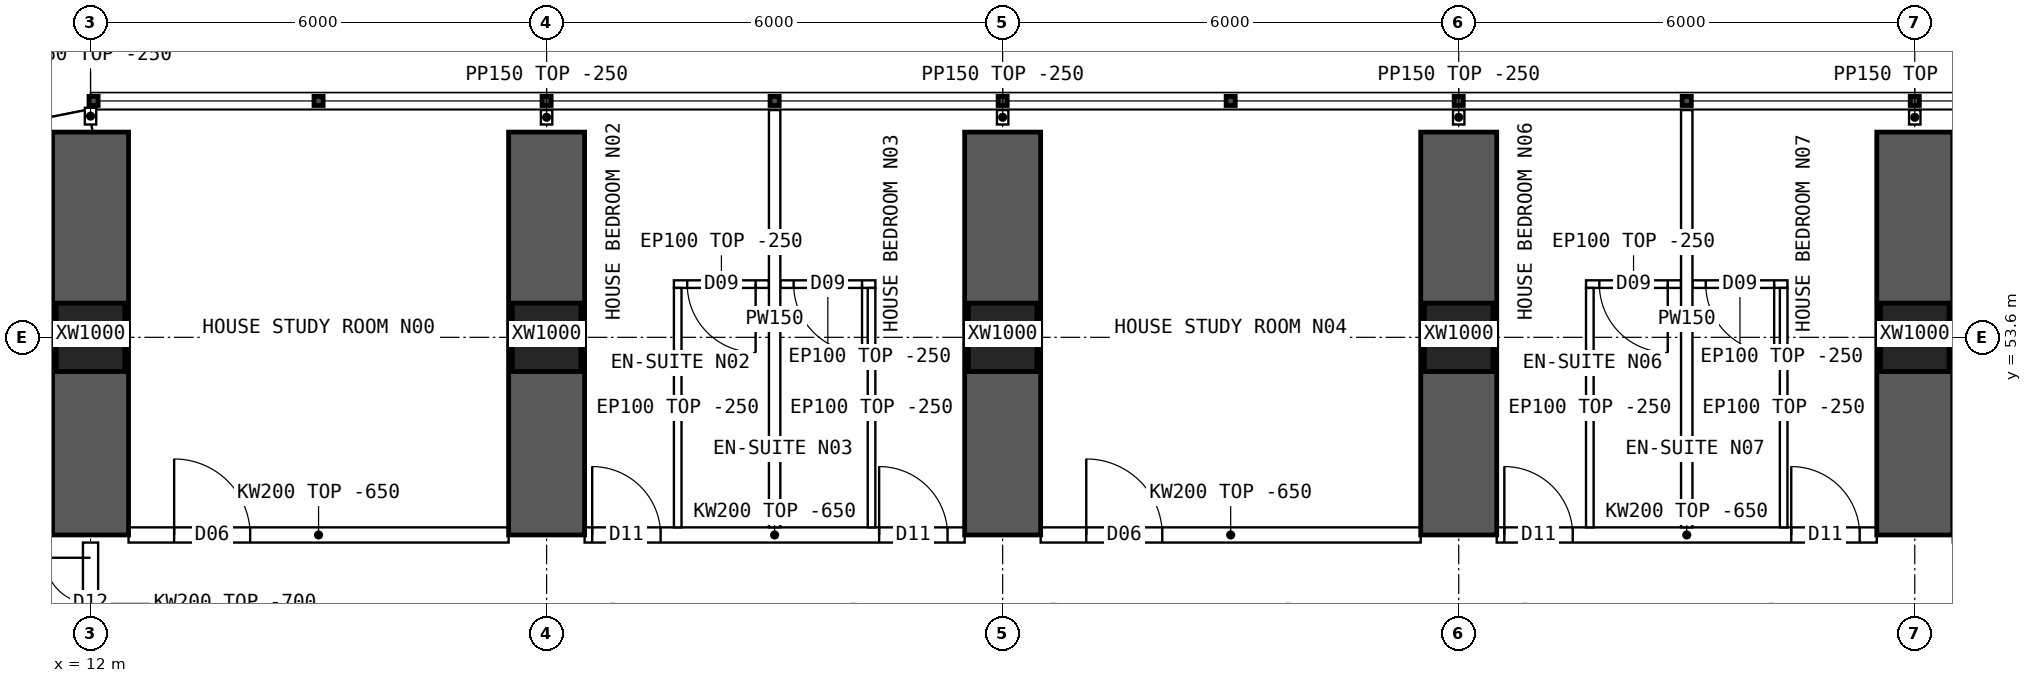
"""IFC4 building model, lengths in metres.
Left out: names, types, materials, properties, quantities, classifications, styles, units other than length and angle.
Written with IfcOpenShell. Run it as: python <this file> out.ifc"""

import sys

from ifc_helpers import new_model, si_unit, direction, frame, frame_2d, origin, origin_2d, place, context, subcontext, project, spatial, polyline, rectangle, hollow_rectangle, outline, extrude, element, fill, save


model = new_model("IFC4")
c1 = context("Model", 3, precision=1e-05, world=origin(), true_north=direction((0.0, 1.0)))
c2 = subcontext(c1, "Body", "Model", "MODEL_VIEW")
j1 = project(units=[si_unit("LENGTHUNIT", "METRE"), si_unit("PLANEANGLEUNIT", "RADIAN")], contexts=[c1])
p1 = place(None, origin())
s1 = spatial("IfcSite", under=j1, at=p1, CompositionType="ELEMENT")
p2 = place(p1, origin())
s2 = spatial("IfcBuilding", under=s1, at=p2, CompositionType="ELEMENT")
p3 = place(p2, frame((0.0, 0.0, 57.7)))
s3 = spatial("IfcBuildingStorey", under=s2, at=p3, CompositionType="ELEMENT", Elevation=57.7)
for number, where, z_axis, x_axis in (
    (1, (12.0, 53.6, 0.0), (0.0, 0.0, 1.0), (1.0, 0.0, 0.0)),
    (2, (18.0, 53.6, 0.0), (0.0, 0.0, 1.0), (1.0, 0.0, 0.0)),
    (3, (24.0, 53.6, 0.0), (0.0, 0.0, 1.0), (1.0, 0.0, 0.0)),
    (4, (30.0, 53.6, 0.0), (0.0, 0.0, 1.0), (1.0, 0.0, 0.0)),
    (5, (36.0, 53.6, 0.0), (0.0, 0.0, 1.0), (1.0, 0.0, 0.0)),
):
    element("IfcColumn", number, at=place(p3, frame(where, z_axis=z_axis, x_axis=x_axis)), inside=s3, PredefinedType="COLUMN", context=c2, shape_type="SweptSolid", body=[
        extrude(hollow_rectangle(XDim=0.9, YDim=0.9, WallThickness=0.09, at=origin_2d()), origin(), (0.0, 0.0, 1.0), 3.75),
    ])
for number, where, z_axis, x_axis in (
    (6, (12.0, 51.0, 0.0), (0.0, 0.0, 1.0), (0.0, 1.0, 0.0)),
    (7, (18.0, 51.0, 0.0), (0.0, 0.0, 1.0), (0.0, 1.0, 0.0)),
    (8, (24.0, 51.0, 0.0), (0.0, 0.0, 1.0), (0.0, 1.0, 0.0)),
    (9, (30.0, 51.0, 0.0), (0.0, 0.0, 1.0), (0.0, 1.0, 0.0)),
    (10, (36.0, 51.0, 0.0), (0.0, 0.0, 1.0), (0.0, 1.0, 0.0)),
):
    element("IfcWall", number, at=place(p3, frame(where, z_axis=z_axis, x_axis=x_axis)), inside=s3, PredefinedType="SHEAR", context=c2, shape_type="SweptSolid", body=[
        extrude(rectangle(XDim=5.3, YDim=1.0, at=frame_2d((2.65, 0.0))), origin(), (0.0, 0.0, 1.0), 3.75),
    ])
p4 = place(p3, frame((12.0, 56.45, 0.0), z_axis=(0.0, 0.0, 1.0), x_axis=(-0.980787251524, -0.195080412259, 0.0)))
e11 = element("IfcWall", 11, at=p4, inside=s3, PredefinedType="SOLIDWALL", context=c2, shape_type="SweptSolid", body=[
    extrude(outline(polyline([(-0.03, -0.15), (3.249, -0.15), (3.189, 0.15), (0.03, 0.15), (-0.03, -0.15)])), origin(), (0.0, 0.0, 1.0), 3.5),
])
p5 = place(p4, frame((0.909, 0.0, 0.9)))
e12 = element("IfcOpeningElement", 12, at=p5, cuts=e11, PredefinedType="OPENING", context=c2, shape_type="SweptSolid", body=[
    extrude(rectangle(XDim=1.4, YDim=1.8, at=frame_2d((0.7, 0.9))), frame((0.0, 0.16, 0.0), z_axis=(0.0, -1.0, 0.0), x_axis=(1.0, 0.0, 0.0)), (0.0, 0.0, 1.0), 0.32),
])
p6 = place(p3, frame((12.5, 51.0, 0.0), z_axis=(0.0, 0.0, 1.0), x_axis=(1.0, 0.0, 0.0)))
e13 = element("IfcWall", 13, at=p6, inside=s3, PredefinedType="SOLIDWALL", context=c2, shape_type="SweptSolid", body=[
    extrude(outline(polyline([(0.0, 0.0), (5.0, 0.0), (5.0, 3.1), (0.0, 3.1), (0.0, 0.0)])), frame((0.0, 0.1, 0.0), z_axis=(0.0, -1.0, 0.0), x_axis=(1.0, 0.0, 0.0)), (0.0, 0.0, 1.0), 0.2),
])
p7 = place(p6, frame((0.6, 0.0, 0.0)))
e14 = element("IfcOpeningElement", 14, at=p7, cuts=e13, PredefinedType="OPENING", context=c2, shape_type="SweptSolid", body=[
    extrude(rectangle(XDim=1.0, YDim=2.1, at=frame_2d((0.5, 1.05))), frame((0.0, 0.11, 0.0), z_axis=(0.0, -1.0, 0.0), x_axis=(1.0, 0.0, 0.0)), (0.0, 0.0, 1.0), 0.22),
])
p8 = place(p3, frame((18.5, 51.0, 0.0), z_axis=(0.0, 0.0, 1.0), x_axis=(1.0, 0.0, 0.0)))
e15 = element("IfcWall", 15, at=p8, inside=s3, PredefinedType="SOLIDWALL", context=c2, shape_type="SweptSolid", body=[
    extrude(outline(polyline([(0.0, 0.0), (5.0, 0.0), (5.0, 3.1), (0.0, 3.1), (0.0, 0.0)])), frame((0.0, 0.1, 0.0), z_axis=(0.0, -1.0, 0.0), x_axis=(1.0, 0.0, 0.0)), (0.0, 0.0, 1.0), 0.2),
])
p9 = place(p8, frame((0.1, 0.0, 0.0)))
e16 = element("IfcOpeningElement", 16, at=p9, cuts=e15, PredefinedType="OPENING", context=c2, shape_type="SweptSolid", body=[
    extrude(rectangle(XDim=0.9, YDim=2.1, at=frame_2d((0.45, 1.05))), frame((0.0, 0.11, 0.0), z_axis=(0.0, -1.0, 0.0), x_axis=(1.0, 0.0, 0.0)), (0.0, 0.0, 1.0), 0.22),
])
p10 = place(p8, frame((3.875, 0.0, 0.0)))
e17 = element("IfcOpeningElement", 17, at=p10, cuts=e15, PredefinedType="OPENING", context=c2, shape_type="SweptSolid", body=[
    extrude(rectangle(XDim=0.9, YDim=2.1, at=frame_2d((0.45, 1.05))), frame((0.0, 0.11, 0.0), z_axis=(0.0, -1.0, 0.0), x_axis=(1.0, 0.0, 0.0)), (0.0, 0.0, 1.0), 0.22),
])
p11 = place(p3, frame((24.5, 51.0, 0.0), z_axis=(0.0, 0.0, 1.0), x_axis=(1.0, 0.0, 0.0)))
e18 = element("IfcWall", 18, at=p11, inside=s3, PredefinedType="SOLIDWALL", context=c2, shape_type="SweptSolid", body=[
    extrude(outline(polyline([(0.0, 0.0), (5.0, 0.0), (5.0, 3.1), (0.0, 3.1), (0.0, 0.0)])), frame((0.0, 0.1, 0.0), z_axis=(0.0, -1.0, 0.0), x_axis=(1.0, 0.0, 0.0)), (0.0, 0.0, 1.0), 0.2),
])
p12 = place(p11, frame((0.6, 0.0, 0.0)))
e19 = element("IfcOpeningElement", 19, at=p12, cuts=e18, PredefinedType="OPENING", context=c2, shape_type="SweptSolid", body=[
    extrude(rectangle(XDim=1.0, YDim=2.1, at=frame_2d((0.5, 1.05))), frame((0.0, 0.11, 0.0), z_axis=(0.0, -1.0, 0.0), x_axis=(1.0, 0.0, 0.0)), (0.0, 0.0, 1.0), 0.22),
])
p13 = place(p3, frame((30.5, 51.0, 0.0), z_axis=(0.0, 0.0, 1.0), x_axis=(1.0, 0.0, 0.0)))
e20 = element("IfcWall", 20, at=p13, inside=s3, PredefinedType="SOLIDWALL", context=c2, shape_type="SweptSolid", body=[
    extrude(outline(polyline([(0.0, 0.0), (5.0, 0.0), (5.0, 3.1), (0.0, 3.1), (0.0, 0.0)])), frame((0.0, 0.1, 0.0), z_axis=(0.0, -1.0, 0.0), x_axis=(1.0, 0.0, 0.0)), (0.0, 0.0, 1.0), 0.2),
])
p14 = place(p13, frame((0.1, 0.0, 0.0)))
e21 = element("IfcOpeningElement", 21, at=p14, cuts=e20, PredefinedType="OPENING", context=c2, shape_type="SweptSolid", body=[
    extrude(rectangle(XDim=0.9, YDim=2.1, at=frame_2d((0.45, 1.05))), frame((0.0, 0.11, 0.0), z_axis=(0.0, -1.0, 0.0), x_axis=(1.0, 0.0, 0.0)), (0.0, 0.0, 1.0), 0.22),
])
p15 = place(p13, frame((3.875, 0.0, 0.0)))
e22 = element("IfcOpeningElement", 22, at=p15, cuts=e20, PredefinedType="OPENING", context=c2, shape_type="SweptSolid", body=[
    extrude(rectangle(XDim=0.9, YDim=2.1, at=frame_2d((0.45, 1.05))), frame((0.0, 0.11, 0.0), z_axis=(0.0, -1.0, 0.0), x_axis=(1.0, 0.0, 0.0)), (0.0, 0.0, 1.0), 0.22),
])
p16 = place(p3, frame((21.0, 56.59, 0.0), z_axis=(0.0, 0.0, 1.0), x_axis=(0.0, -1.0, 0.0)))
e23 = element("IfcWall", 23, at=p16, inside=s3, PredefinedType="PARTITIONING", context=c2, shape_type="SweptSolid", body=[
    extrude(outline(polyline([(0.0, 0.0), (5.49, 0.0), (5.49, 3.1), (5.442, 3.1), (5.44, 3.5), (3.192, 3.5), (3.19, 3.1), (2.792, 3.1), (2.79, 3.5), (0.0, 3.5), (0.0, 0.0)])), frame((0.0, 0.075, 0.0), z_axis=(0.0, -1.0, 0.0), x_axis=(1.0, 0.0, 0.0)), (0.0, 0.0, 1.0), 0.15),
])
p17 = place(p3, frame((19.675, 54.3, 0.0), z_axis=(0.0, 0.0, 1.0), x_axis=(1.0, 0.0, 0.0)))
e24 = element("IfcWall", 24, at=p17, inside=s3, PredefinedType="PARTITIONING", context=c2, shape_type="SweptSolid", body=[
    extrude(rectangle(XDim=1.25, YDim=0.1, at=frame_2d((0.625, 0.0))), origin(), (0.0, 0.0, 1.0), 3.5),
])
p18 = place(p17, frame((0.175, 0.0, 0.0)))
e25 = element("IfcOpeningElement", 25, at=p18, cuts=e24, PredefinedType="OPENING", context=c2, shape_type="SweptSolid", body=[
    extrude(rectangle(XDim=0.9, YDim=2.1, at=frame_2d((0.45, 1.05))), frame((0.0, 0.06, 0.0), z_axis=(0.0, -1.0, 0.0), x_axis=(1.0, 0.0, 0.0)), (0.0, 0.0, 1.0), 0.12),
])
p19 = place(p3, frame((19.725, 54.25, 0.0), z_axis=(0.0, 0.0, 1.0), x_axis=(0.0, -1.0, 0.0)))
e26 = element("IfcWall", 26, at=p19, inside=s3, PredefinedType="PARTITIONING", context=c2, shape_type="SweptSolid", body=[
    extrude(outline(polyline([(0.0, 0.0), (3.15, 0.0), (3.15, 3.1), (3.102, 3.1), (3.1, 3.5), (0.852, 3.5), (0.85, 3.1), (0.452, 3.1), (0.45, 3.5), (0.0, 3.5), (0.0, 0.0)])), frame((0.0, 0.05, 0.0), z_axis=(0.0, -1.0, 0.0), x_axis=(1.0, 0.0, 0.0)), (0.0, 0.0, 1.0), 0.1),
])
p20 = place(p3, frame((21.075, 54.3, 0.0), z_axis=(0.0, 0.0, 1.0), x_axis=(1.0, 0.0, 0.0)))
e27 = element("IfcWall", 27, at=p20, inside=s3, PredefinedType="PARTITIONING", context=c2, shape_type="SweptSolid", body=[
    extrude(rectangle(XDim=1.25, YDim=0.1, at=frame_2d((0.625, 0.0))), origin(), (0.0, 0.0, 1.0), 3.5),
])
p21 = place(p20, frame((0.175, 0.0, 0.0)))
e28 = element("IfcOpeningElement", 28, at=p21, cuts=e27, PredefinedType="OPENING", context=c2, shape_type="SweptSolid", body=[
    extrude(rectangle(XDim=0.9, YDim=2.1, at=frame_2d((0.45, 1.05))), frame((0.0, 0.06, 0.0), z_axis=(0.0, -1.0, 0.0), x_axis=(1.0, 0.0, 0.0)), (0.0, 0.0, 1.0), 0.12),
])
p22 = place(p3, frame((22.275, 54.25, 0.0), z_axis=(0.0, 0.0, 1.0), x_axis=(0.0, -1.0, 0.0)))
e29 = element("IfcWall", 29, at=p22, inside=s3, PredefinedType="PARTITIONING", context=c2, shape_type="SweptSolid", body=[
    extrude(outline(polyline([(0.0, 0.0), (3.15, 0.0), (3.15, 3.1), (3.102, 3.1), (3.1, 3.5), (0.852, 3.5), (0.85, 3.1), (0.452, 3.1), (0.45, 3.5), (0.0, 3.5), (0.0, 0.0)])), frame((0.0, 0.05, 0.0), z_axis=(0.0, -1.0, 0.0), x_axis=(1.0, 0.0, 0.0)), (0.0, 0.0, 1.0), 0.1),
])
p23 = place(p3, frame((33.0, 56.59, 0.0), z_axis=(0.0, 0.0, 1.0), x_axis=(0.0, -1.0, 0.0)))
e30 = element("IfcWall", 30, at=p23, inside=s3, PredefinedType="PARTITIONING", context=c2, shape_type="SweptSolid", body=[
    extrude(outline(polyline([(0.0, 0.0), (5.49, 0.0), (5.49, 3.1), (5.442, 3.1), (5.44, 3.5), (3.192, 3.5), (3.19, 3.1), (2.792, 3.1), (2.79, 3.5), (0.0, 3.5), (0.0, 0.0)])), frame((0.0, 0.075, 0.0), z_axis=(0.0, -1.0, 0.0), x_axis=(1.0, 0.0, 0.0)), (0.0, 0.0, 1.0), 0.15),
])
p24 = place(p3, frame((31.675, 54.3, 0.0), z_axis=(0.0, 0.0, 1.0), x_axis=(1.0, 0.0, 0.0)))
e31 = element("IfcWall", 31, at=p24, inside=s3, PredefinedType="PARTITIONING", context=c2, shape_type="SweptSolid", body=[
    extrude(rectangle(XDim=1.25, YDim=0.1, at=frame_2d((0.625, 0.0))), origin(), (0.0, 0.0, 1.0), 3.5),
])
p25 = place(p24, frame((0.175, 0.0, 0.0)))
e32 = element("IfcOpeningElement", 32, at=p25, cuts=e31, PredefinedType="OPENING", context=c2, shape_type="SweptSolid", body=[
    extrude(rectangle(XDim=0.9, YDim=2.1, at=frame_2d((0.45, 1.05))), frame((0.0, 0.06, 0.0), z_axis=(0.0, -1.0, 0.0), x_axis=(1.0, 0.0, 0.0)), (0.0, 0.0, 1.0), 0.12),
])
p26 = place(p3, frame((31.725, 54.25, 0.0), z_axis=(0.0, 0.0, 1.0), x_axis=(0.0, -1.0, 0.0)))
e33 = element("IfcWall", 33, at=p26, inside=s3, PredefinedType="PARTITIONING", context=c2, shape_type="SweptSolid", body=[
    extrude(outline(polyline([(0.0, 0.0), (3.15, 0.0), (3.15, 3.1), (3.102, 3.1), (3.1, 3.5), (0.852, 3.5), (0.85, 3.1), (0.452, 3.1), (0.45, 3.5), (0.0, 3.5), (0.0, 0.0)])), frame((0.0, 0.05, 0.0), z_axis=(0.0, -1.0, 0.0), x_axis=(1.0, 0.0, 0.0)), (0.0, 0.0, 1.0), 0.1),
])
p27 = place(p3, frame((33.075, 54.3, 0.0), z_axis=(0.0, 0.0, 1.0), x_axis=(1.0, 0.0, 0.0)))
e34 = element("IfcWall", 34, at=p27, inside=s3, PredefinedType="PARTITIONING", context=c2, shape_type="SweptSolid", body=[
    extrude(rectangle(XDim=1.25, YDim=0.1, at=frame_2d((0.625, 0.0))), origin(), (0.0, 0.0, 1.0), 3.5),
])
p28 = place(p27, frame((0.175, 0.0, 0.0)))
e35 = element("IfcOpeningElement", 35, at=p28, cuts=e34, PredefinedType="OPENING", context=c2, shape_type="SweptSolid", body=[
    extrude(rectangle(XDim=0.9, YDim=2.1, at=frame_2d((0.45, 1.05))), frame((0.0, 0.06, 0.0), z_axis=(0.0, -1.0, 0.0), x_axis=(1.0, 0.0, 0.0)), (0.0, 0.0, 1.0), 0.12),
])
p29 = place(p3, frame((34.275, 54.25, 0.0), z_axis=(0.0, 0.0, 1.0), x_axis=(0.0, -1.0, 0.0)))
e36 = element("IfcWall", 36, at=p29, inside=s3, PredefinedType="PARTITIONING", context=c2, shape_type="SweptSolid", body=[
    extrude(outline(polyline([(0.0, 0.0), (3.15, 0.0), (3.15, 3.1), (3.102, 3.1), (3.1, 3.5), (0.852, 3.5), (0.85, 3.1), (0.452, 3.1), (0.45, 3.5), (0.0, 3.5), (0.0, 0.0)])), frame((0.0, 0.05, 0.0), z_axis=(0.0, -1.0, 0.0), x_axis=(1.0, 0.0, 0.0)), (0.0, 0.0, 1.0), 0.1),
])
p30 = place(p3, frame((12.0, 49.3, 0.0), z_axis=(0.0, 0.0, 1.0), x_axis=(0.0, 1.0, 0.0)))
e37 = element("IfcWall", 37, at=p30, inside=s3, PredefinedType="SOLIDWALL", context=c2, shape_type="SweptSolid", body=[
    extrude(outline(polyline([(0.0, 0.0), (1.6, 0.0), (1.6, 3.05), (0.0, 3.05), (0.0, 0.0)])), frame((0.0, 0.1, 0.0), z_axis=(0.0, -1.0, 0.0), x_axis=(1.0, 0.0, 0.0)), (0.0, 0.0, 1.0), 0.2),
])
p31 = place(p30, frame((0.2, 0.0, 0.0)))
e38 = element("IfcOpeningElement", 38, at=p31, cuts=e37, PredefinedType="OPENING", context=c2, shape_type="SweptSolid", body=[
    extrude(rectangle(XDim=1.2, YDim=2.1, at=frame_2d((0.6, 1.05))), frame((0.0, 0.11, 0.0), z_axis=(0.0, -1.0, 0.0), x_axis=(1.0, 0.0, 0.0)), (0.0, 0.0, 1.0), 0.22),
])
p32 = place(p3, frame((12.0, 56.4, 0.0), z_axis=(0.0, 0.0, 1.0), x_axis=(0.0, 1.0, 0.0)))
e39 = element("IfcWall", 39, at=p32, inside=s3, PredefinedType="PARTITIONING", context=c2, shape_type="SweptSolid", body=[
    extrude(rectangle(XDim=0.22, YDim=0.15, at=frame_2d((0.11, 0.0))), origin(), (0.0, 0.0, 1.0), 3.5),
])
for number, where, z_axis, x_axis in (
    (40, (18.0, 56.4, 0.0), (0.0, 0.0, 1.0), (0.0, 1.0, 0.0)),
    (41, (24.0, 56.4, 0.0), (0.0, 0.0, 1.0), (0.0, 1.0, 0.0)),
    (42, (30.0, 56.4, 0.0), (0.0, 0.0, 1.0), (0.0, 1.0, 0.0)),
    (43, (36.0, 56.4, 0.0), (0.0, 0.0, 1.0), (0.0, 1.0, 0.0)),
):
    element("IfcWall", number, at=place(p3, frame(where, z_axis=z_axis, x_axis=x_axis)), inside=s3, PredefinedType="PARTITIONING", context=c2, shape_type="SweptSolid", body=[
        extrude(rectangle(XDim=0.19, YDim=0.15, at=frame_2d((0.095, 0.0))), origin(), (0.0, 0.0, 1.0), 3.5),
    ])
p33 = place(p7, origin())
e44 = element("IfcDoor", 44, at=p33, inside=s3, OperationType="SINGLE_SWING_LEFT", PredefinedType="DOOR", context=c2, shape_type="SweptSolid", body=[
    extrude(rectangle(XDim=1.0, YDim=2.1, at=frame_2d((0.5, 1.05))), frame((0.0, 0.025, 0.0), z_axis=(0.0, -1.0, 0.0), x_axis=(1.0, 0.0, 0.0)), (0.0, 0.0, 1.0), 0.05),
])
fill(e14, e44)
p34 = place(p18, origin())
e45 = element("IfcDoor", 45, at=p34, inside=s3, OperationType="SINGLE_SWING_RIGHT", PredefinedType="DOOR", context=c2, shape_type="SweptSolid", body=[
    extrude(rectangle(XDim=0.9, YDim=2.1, at=frame_2d((0.45, 1.05))), frame((0.0, 0.025, 0.0), z_axis=(0.0, -1.0, 0.0), x_axis=(1.0, 0.0, 0.0)), (0.0, 0.0, 1.0), 0.05),
])
fill(e25, e45)
p35 = place(p9, origin())
e46 = element("IfcDoor", 46, at=p35, inside=s3, OperationType="SINGLE_SWING_LEFT", PredefinedType="DOOR", context=c2, shape_type="SweptSolid", body=[
    extrude(rectangle(XDim=0.9, YDim=2.1, at=frame_2d((0.45, 1.05))), frame((0.0, 0.025, 0.0), z_axis=(0.0, -1.0, 0.0), x_axis=(1.0, 0.0, 0.0)), (0.0, 0.0, 1.0), 0.05),
])
fill(e16, e46)
p36 = place(p21, origin())
e47 = element("IfcDoor", 47, at=p36, inside=s3, OperationType="SINGLE_SWING_RIGHT", PredefinedType="DOOR", context=c2, shape_type="SweptSolid", body=[
    extrude(rectangle(XDim=0.9, YDim=2.1, at=frame_2d((0.45, 1.05))), frame((0.0, 0.025, 0.0), z_axis=(0.0, -1.0, 0.0), x_axis=(1.0, 0.0, 0.0)), (0.0, 0.0, 1.0), 0.05),
])
fill(e28, e47)
p37 = place(p10, origin())
e48 = element("IfcDoor", 48, at=p37, inside=s3, OperationType="SINGLE_SWING_LEFT", PredefinedType="DOOR", context=c2, shape_type="SweptSolid", body=[
    extrude(rectangle(XDim=0.9, YDim=2.1, at=frame_2d((0.45, 1.05))), frame((0.0, 0.025, 0.0), z_axis=(0.0, -1.0, 0.0), x_axis=(1.0, 0.0, 0.0)), (0.0, 0.0, 1.0), 0.05),
])
fill(e17, e48)
p38 = place(p12, origin())
e49 = element("IfcDoor", 49, at=p38, inside=s3, OperationType="SINGLE_SWING_LEFT", PredefinedType="DOOR", context=c2, shape_type="SweptSolid", body=[
    extrude(rectangle(XDim=1.0, YDim=2.1, at=frame_2d((0.5, 1.05))), frame((0.0, 0.025, 0.0), z_axis=(0.0, -1.0, 0.0), x_axis=(1.0, 0.0, 0.0)), (0.0, 0.0, 1.0), 0.05),
])
fill(e19, e49)
p39 = place(p25, origin())
e50 = element("IfcDoor", 50, at=p39, inside=s3, OperationType="SINGLE_SWING_RIGHT", PredefinedType="DOOR", context=c2, shape_type="SweptSolid", body=[
    extrude(rectangle(XDim=0.9, YDim=2.1, at=frame_2d((0.45, 1.05))), frame((0.0, 0.025, 0.0), z_axis=(0.0, -1.0, 0.0), x_axis=(1.0, 0.0, 0.0)), (0.0, 0.0, 1.0), 0.05),
])
fill(e32, e50)
p40 = place(p14, origin())
e51 = element("IfcDoor", 51, at=p40, inside=s3, OperationType="SINGLE_SWING_LEFT", PredefinedType="DOOR", context=c2, shape_type="SweptSolid", body=[
    extrude(rectangle(XDim=0.9, YDim=2.1, at=frame_2d((0.45, 1.05))), frame((0.0, 0.025, 0.0), z_axis=(0.0, -1.0, 0.0), x_axis=(1.0, 0.0, 0.0)), (0.0, 0.0, 1.0), 0.05),
])
fill(e21, e51)
p41 = place(p28, origin())
e52 = element("IfcDoor", 52, at=p41, inside=s3, OperationType="SINGLE_SWING_RIGHT", PredefinedType="DOOR", context=c2, shape_type="SweptSolid", body=[
    extrude(rectangle(XDim=0.9, YDim=2.1, at=frame_2d((0.45, 1.05))), frame((0.0, 0.025, 0.0), z_axis=(0.0, -1.0, 0.0), x_axis=(1.0, 0.0, 0.0)), (0.0, 0.0, 1.0), 0.05),
])
fill(e35, e52)
p42 = place(p15, origin())
e53 = element("IfcDoor", 53, at=p42, inside=s3, OperationType="SINGLE_SWING_LEFT", PredefinedType="DOOR", context=c2, shape_type="SweptSolid", body=[
    extrude(rectangle(XDim=0.9, YDim=2.1, at=frame_2d((0.45, 1.05))), frame((0.0, 0.025, 0.0), z_axis=(0.0, -1.0, 0.0), x_axis=(1.0, 0.0, 0.0)), (0.0, 0.0, 1.0), 0.05),
])
fill(e22, e53)
p43 = place(p31, origin())
e54 = element("IfcDoor", 54, at=p43, inside=s3, OperationType="DOUBLE_DOOR_SINGLE_SWING", PredefinedType="DOOR", context=c2, shape_type="SweptSolid", body=[
    extrude(rectangle(XDim=1.2, YDim=2.1, at=frame_2d((0.6, 1.05))), frame((0.0, 0.025, 0.0), z_axis=(0.0, -1.0, 0.0), x_axis=(1.0, 0.0, 0.0)), (0.0, 0.0, 1.0), 0.05),
])
fill(e38, e54)
save(model, sys.argv[1])
